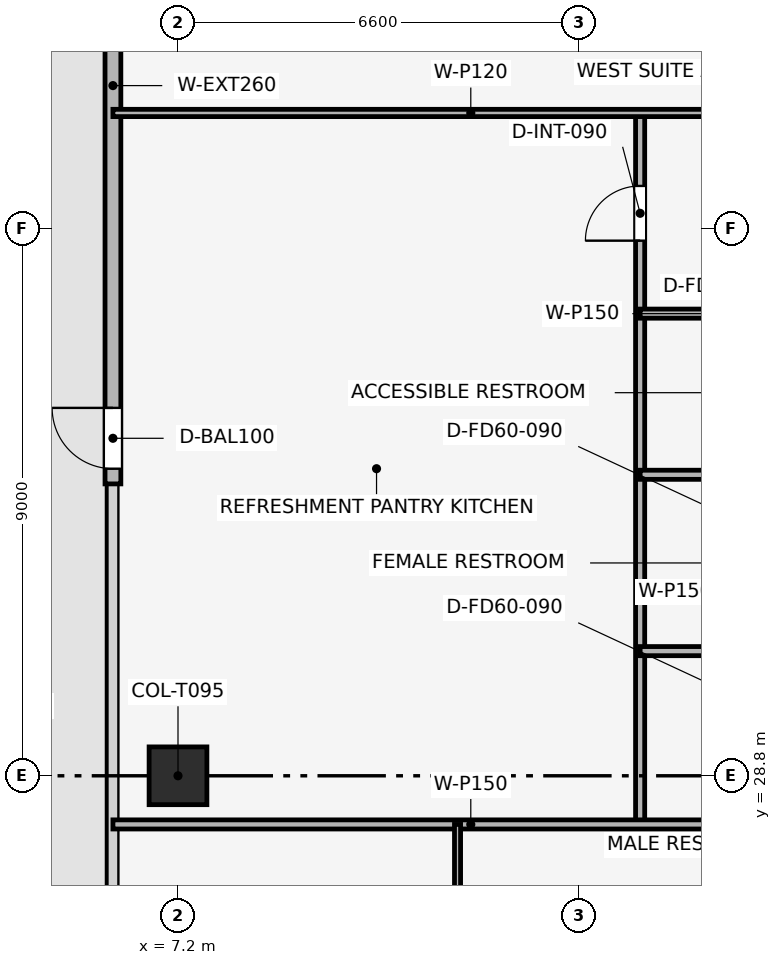
"""IFC4 building model, lengths in metres.
Left out: names, types, materials, properties, quantities, classifications, styles, units other than length and angle.
Written with IfcOpenShell. Run it as: python <this file> out.ifc"""

import sys

from ifc_helpers import new_model, si_unit, direction, frame, frame_2d, origin, origin_2d, place, context, subcontext, project, spatial, rectangle, extrude, element, fill, save


model = new_model("IFC4")
c1 = context("Model", 3, precision=1e-05, world=origin(), true_north=direction((0.0, 1.0)))
c2 = subcontext(c1, "Body", "Model", "MODEL_VIEW")
j1 = project(units=[si_unit("LENGTHUNIT", "METRE"), si_unit("PLANEANGLEUNIT", "RADIAN")], contexts=[c1])
p1 = place(None, origin())
s1 = spatial("IfcSite", under=j1, at=p1, CompositionType="ELEMENT")
p2 = place(p1, origin())
s2 = spatial("IfcBuilding", under=s1, at=p2, CompositionType="ELEMENT")
p3 = place(p2, frame((0.0, 0.0, 314.25)))
s3 = spatial("IfcBuildingStorey", under=s2, at=p3, CompositionType="ELEMENT", Elevation=314.25)
p4 = place(p3, frame((7.2, 28.8, 0.003), z_axis=(0.0, 0.0, 1.0), x_axis=(1.0, 0.0, 0.0)))
e1 = element("IfcColumn", 1, at=p4, inside=s3, PredefinedType="COLUMN", context=c2, shape_type="SweptSolid", body=[
    extrude(rectangle(XDim=0.95, YDim=0.95, at=origin_2d()), origin(), (0.0, 0.0, 1.0), 3.504),
])
p5 = place(p3, frame((6.13, 33.6, 0.0), z_axis=(0.0, 0.0, 1.0), x_axis=(0.0, 1.0, 0.0)))
e2 = element("IfcWall", 2, at=p5, inside=s3, PredefinedType="SOLIDWALL", context=c2, shape_type="SweptSolid", body=[
    extrude(rectangle(XDim=11.7, YDim=0.26, at=frame_2d((5.85, 0.0))), origin(), (0.0, 0.0, 1.0), 3.51),
])
p6 = place(p5, frame((0.25, 0.0, 0.0)))
e3 = element("IfcOpeningElement", 3, at=p6, cuts=e2, PredefinedType="OPENING", context=c2, shape_type="SweptSolid", body=[
    extrude(rectangle(XDim=1.0, YDim=2.2, at=frame_2d((0.5, 1.1))), frame((0.0, 0.14, 0.0), z_axis=(0.0, -1.0, 0.0), x_axis=(1.0, 0.0, 0.0)), (0.0, 0.0, 1.0), 0.28),
])
p7 = place(p3, frame((14.8, 28.0, 0.0), z_axis=(0.0, 0.0, 1.0), x_axis=(0.0, 1.0, 0.0)))
e4 = element("IfcWall", 4, at=p7, inside=s3, PredefinedType="PARTITIONING", context=c2, shape_type="SweptSolid", body=[
    extrude(rectangle(XDim=11.7, YDim=0.15, at=frame_2d((5.85, 0.0))), origin(), (0.0, 0.0, 1.0), 3.095),
])
p8 = place(p7, frame((9.6, 0.0, 0.0)))
e5 = element("IfcOpeningElement", 5, at=p8, cuts=e4, PredefinedType="OPENING", context=c2, shape_type="SweptSolid", body=[
    extrude(rectangle(XDim=0.9, YDim=2.1, at=frame_2d((0.45, 1.05))), frame((0.0, 0.085, 0.0), z_axis=(0.0, -1.0, 0.0), x_axis=(1.0, 0.0, 0.0)), (0.0, 0.0, 1.0), 0.17),
])
p9 = place(p3, frame((6.13, 28.0, 0.0), z_axis=(0.0, 0.0, 1.0), x_axis=(1.0, 0.0, 0.0)))
e6 = element("IfcWall", 6, at=p9, inside=s3, PredefinedType="PARTITIONING", context=c2, shape_type="SweptSolid", body=[
    extrude(rectangle(XDim=11.77, YDim=0.15, at=frame_2d((5.885, 0.0))), origin(), (0.0, 0.0, 1.0), 3.135),
])
for number, where, z_axis, x_axis in (
    (7, (14.8, 36.4, 0.0), (0.0, 0.0, 1.0), (1.0, 0.0, 0.0)),
    (8, (14.8, 30.85, 0.0), (0.0, 0.0, 1.0), (1.0, 0.0, 0.0)),
    (9, (14.8, 33.75, 0.0), (0.0, 0.0, 1.0), (1.0, 0.0, 0.0)),
):
    element("IfcWall", number, at=place(p3, frame(where, z_axis=z_axis, x_axis=x_axis)), inside=s3, PredefinedType="PARTITIONING", context=c2, shape_type="SweptSolid", body=[
        extrude(rectangle(XDim=3.1, YDim=0.15, at=frame_2d((1.55, 0.0))), origin(), (0.0, 0.0, 1.0), 3.135),
    ])
p10 = place(p3, frame((11.797, 17.93, 0.0), z_axis=(0.0, 0.0, 1.0), x_axis=(0.0, 1.0, 0.0)))
e10 = element("IfcWall", 10, at=p10, inside=s3, PredefinedType="MOVABLE", context=c2, shape_type="SweptSolid", body=[
    extrude(rectangle(XDim=10.07, YDim=0.1, at=frame_2d((5.035, 0.0))), origin(), (0.0, 0.0, 1.0), 3.095),
])
p11 = place(p10, frame((3.489, 0.0, 0.0)))
e11 = element("IfcOpeningElement", 11, at=p11, cuts=e10, PredefinedType="OPENING", context=c2, shape_type="SweptSolid", body=[
    extrude(rectangle(XDim=0.9, YDim=2.1, at=frame_2d((0.45, 1.05))), frame((0.0, 0.06, 0.0), z_axis=(0.0, -1.0, 0.0), x_axis=(1.0, 0.0, 0.0)), (0.0, 0.0, 1.0), 0.12),
])
p12 = place(p3, frame((6.13, 39.7, 0.0), z_axis=(0.0, 0.0, 1.0), x_axis=(1.0, 0.0, 0.0)))
e12 = element("IfcWall", 12, at=p12, inside=s3, PredefinedType="PARTITIONING", context=c2, shape_type="SweptSolid", body=[
    extrude(rectangle(XDim=11.77, YDim=0.12, at=frame_2d((5.885, 0.0))), origin(), (0.0, 0.0, 1.0), 3.095),
])
p13 = place(p6, origin())
e13 = element("IfcDoor", 13, at=p13, inside=s3, OperationType="SINGLE_SWING_RIGHT", PredefinedType="DOOR", context=c2, shape_type="SweptSolid", body=[
    extrude(rectangle(XDim=1.0, YDim=2.2, at=frame_2d((0.5, 1.1))), frame((0.0, 0.025, 0.0), z_axis=(0.0, -1.0, 0.0), x_axis=(1.0, 0.0, 0.0)), (0.0, 0.0, 1.0), 0.05),
])
fill(e3, e13)
p14 = place(p8, origin())
e14 = element("IfcDoor", 14, at=p14, inside=s3, OperationType="SINGLE_SWING_LEFT", PredefinedType="DOOR", context=c2, shape_type="SweptSolid", body=[
    extrude(rectangle(XDim=0.9, YDim=2.1, at=frame_2d((0.45, 1.05))), frame((0.0, 0.025, 0.0), z_axis=(0.0, -1.0, 0.0), x_axis=(1.0, 0.0, 0.0)), (0.0, 0.0, 1.0), 0.05),
])
fill(e5, e14)
save(model, sys.argv[1])
